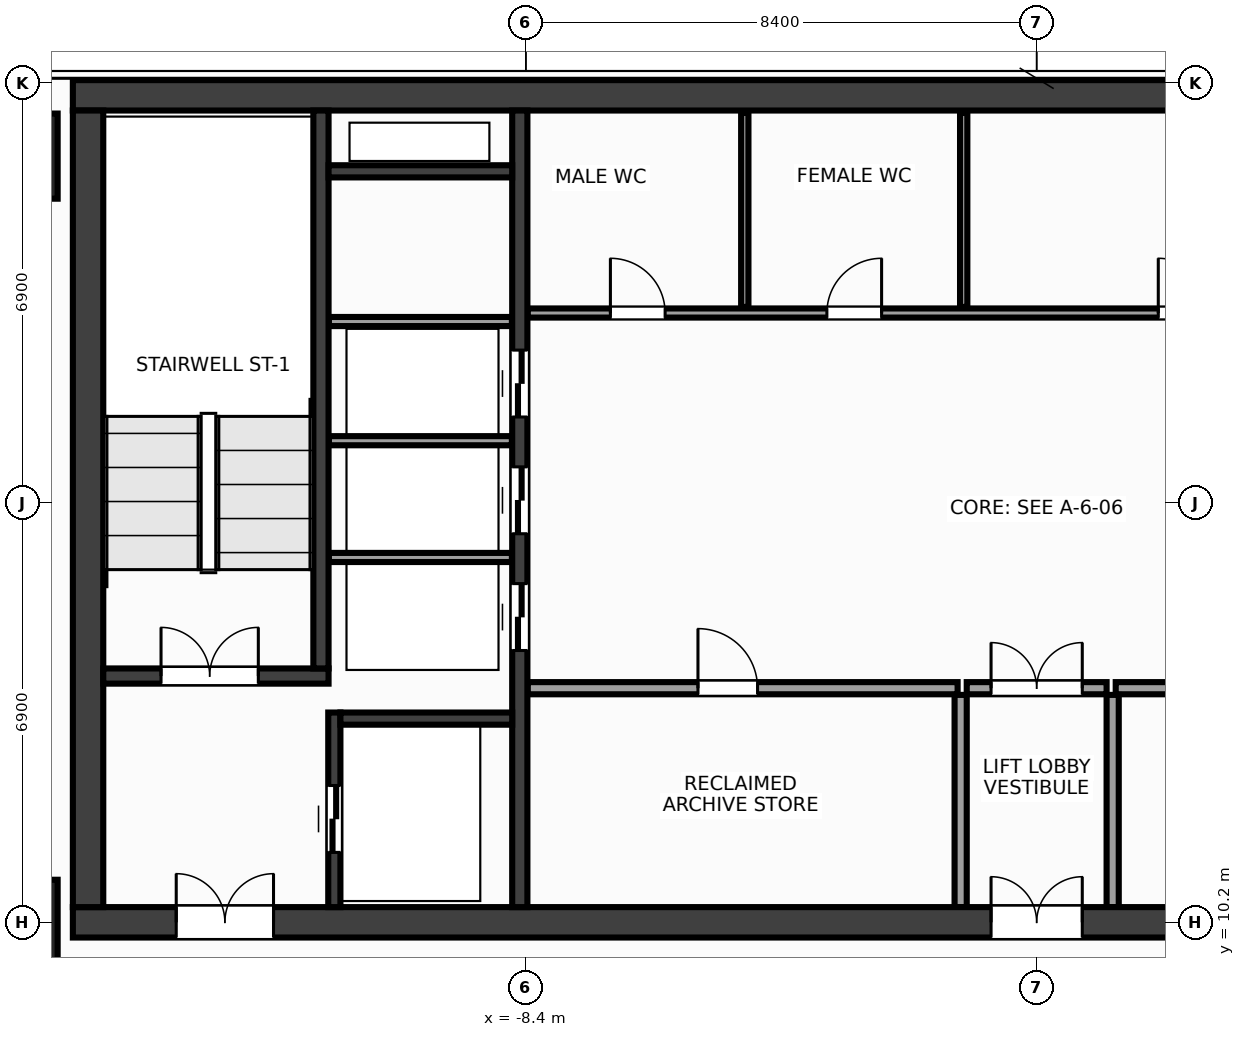
"""IFC4 building model, lengths in metres.
Left out: names, types, materials, properties, quantities, classifications, styles, units other than length and angle.
Written with IfcOpenShell. Run it as: python <this file> out.ifc"""

import sys

from ifc_helpers import new_model, si_unit, direction, frame, frame_2d, origin, origin_2d, place, context, subcontext, project, spatial, rectangle, extrude, source, transform, mapped, element, fill, save


model = new_model("IFC4")
c1 = context("Model", 3, precision=1e-05, world=origin(), true_north=direction((0.0, 1.0)))
c2 = subcontext(c1, "Body", "Model", "MODEL_VIEW")
j1 = project(units=[si_unit("LENGTHUNIT", "METRE"), si_unit("PLANEANGLEUNIT", "RADIAN")], contexts=[c1])
p1 = place(None, origin())
s1 = spatial("IfcSite", under=j1, at=p1, CompositionType="ELEMENT")
p2 = place(p1, origin())
s2 = spatial("IfcBuilding", under=s1, at=p2, CompositionType="ELEMENT")
p3 = place(p2, frame((0.0, 0.0, 268.4)))
s3 = spatial("IfcBuildingStorey", under=s2, at=p3, CompositionType="ELEMENT", Elevation=268.4)
m1 = source(origin(), c2, "Body", "SweptSolid", [
    extrude(rectangle(XDim=31.7, YDim=0.5, at=frame_2d((15.85, 0.0))), origin(), (0.0, 0.0, 1.0), 3.6),
])
p4 = place(p3, frame((-15.85, 23.8, 0.0), z_axis=(0.0, 0.0, 1.0), x_axis=(1.0, 0.0, 0.0)))
e1 = element("IfcWall", 1, at=p4, inside=s3, PredefinedType="SHEAR", context=c2, shape_type="MappedRepresentation", body=[
    mapped(m1, transform((0.0, 0.0, 0.0), x_axis=(1.0, 0.0, 0.0), y_axis=(0.0, 1.0, 0.0), z_axis=(0.0, 0.0, 1.0), scale=1.0)),
])
p5 = place(p3, frame((-15.85, 10.2, 0.0), z_axis=(0.0, 0.0, 1.0), x_axis=(1.0, 0.0, 0.0)))
e2 = element("IfcWall", 2, at=p5, inside=s3, PredefinedType="SHEAR", context=c2, shape_type="MappedRepresentation", body=[
    mapped(m1, transform((0.0, 0.0, 0.0), x_axis=(1.0, 0.0, 0.0), y_axis=(0.0, 1.0, 0.0), z_axis=(0.0, 0.0, 1.0), scale=1.0)),
])
p6 = place(p5, frame((1.7, 0.0, 0.0)))
e3 = element("IfcOpeningElement", 3, at=p6, cuts=e2, PredefinedType="OPENING", context=c2, shape_type="SweptSolid", body=[
    extrude(rectangle(XDim=1.6, YDim=2.15, at=frame_2d((0.8, 1.075))), frame((0.0, 0.262, 0.0), z_axis=(0.0, -1.0, 0.0), x_axis=(1.0, 0.0, 0.0)), (0.0, 0.0, 1.0), 0.524),
])
p7 = place(p5, frame((28.4, 0.0, 0.0)))
e4 = element("IfcOpeningElement", 4, at=p7, cuts=e2, PredefinedType="OPENING", context=c2, shape_type="SweptSolid", body=[
    extrude(rectangle(XDim=1.6, YDim=2.15, at=frame_2d((0.8, 1.075))), frame((0.0, 0.262, 0.0), z_axis=(0.0, -1.0, 0.0), x_axis=(1.0, 0.0, 0.0)), (0.0, 0.0, 1.0), 0.524),
])
p8 = place(p5, frame((15.1, 0.0, 0.0)))
e5 = element("IfcOpeningElement", 5, at=p8, cuts=e2, PredefinedType="OPENING", context=c2, shape_type="SweptSolid", body=[
    extrude(rectangle(XDim=1.5, YDim=2.2, at=frame_2d((0.75, 1.1))), frame((0.0, 0.262, 0.0), z_axis=(0.0, -1.0, 0.0), x_axis=(1.0, 0.0, 0.0)), (0.0, 0.0, 1.0), 0.524),
])
m2 = source(origin(), c2, "Body", "SweptSolid", [
    extrude(rectangle(XDim=13.1, YDim=0.5, at=frame_2d((6.55, 0.0))), origin(), (0.0, 0.0, 1.0), 3.6),
])
p9 = place(p3, frame((-15.6, 10.45, 0.0), z_axis=(0.0, 0.0, 1.0), x_axis=(0.0, 1.0, 0.0)))
e6 = element("IfcWall", 6, at=p9, inside=s3, PredefinedType="SHEAR", context=c2, shape_type="MappedRepresentation", body=[
    mapped(m2, transform((0.0, 0.0, 0.0), x_axis=(1.0, 0.0, 0.0), y_axis=(0.0, 1.0, 0.0), z_axis=(0.0, 0.0, 1.0), scale=1.0)),
])
m3 = source(origin(), c2, "Body", "SweptSolid", [
    extrude(rectangle(XDim=13.1, YDim=0.25, at=frame_2d((6.55, 0.0))), origin(), (0.0, 0.0, 1.0), 3.6),
])
p10 = place(p3, frame((-8.5, 10.45, 0.0), z_axis=(0.0, 0.0, 1.0), x_axis=(0.0, 1.0, 0.0)))
e7 = element("IfcWall", 7, at=p10, inside=s3, PredefinedType="SHEAR", context=c2, shape_type="MappedRepresentation", body=[
    mapped(m3, transform((0.0, 0.0, 0.0), x_axis=(1.0, 0.0, 0.0), y_axis=(0.0, 1.0, 0.0), z_axis=(0.0, 0.0, 1.0), scale=1.0)),
])
p11 = place(p10, frame((4.22, 0.0, 0.0)))
e8 = element("IfcOpeningElement", 8, at=p11, cuts=e7, PredefinedType="OPENING", context=c2, shape_type="SweptSolid", body=[
    extrude(rectangle(XDim=1.1, YDim=2.15, at=frame_2d((0.55, 1.075))), frame((0.0, 0.137, 0.0), z_axis=(0.0, -1.0, 0.0), x_axis=(1.0, 0.0, 0.0)), (0.0, 0.0, 1.0), 0.274),
])
p12 = place(p10, frame((6.14, 0.0, 0.0)))
e9 = element("IfcOpeningElement", 9, at=p12, cuts=e7, PredefinedType="OPENING", context=c2, shape_type="SweptSolid", body=[
    extrude(rectangle(XDim=1.1, YDim=2.15, at=frame_2d((0.55, 1.075))), frame((0.0, 0.137, 0.0), z_axis=(0.0, -1.0, 0.0), x_axis=(1.0, 0.0, 0.0)), (0.0, 0.0, 1.0), 0.274),
])
p13 = place(p10, frame((8.06, 0.0, 0.0)))
e10 = element("IfcOpeningElement", 10, at=p13, cuts=e7, PredefinedType="OPENING", context=c2, shape_type="SweptSolid", body=[
    extrude(rectangle(XDim=1.1, YDim=2.15, at=frame_2d((0.55, 1.075))), frame((0.0, 0.137, 0.0), z_axis=(0.0, -1.0, 0.0), x_axis=(1.0, 0.0, 0.0)), (0.0, 0.0, 1.0), 0.274),
])
m4 = source(origin(), c2, "Body", "SweptSolid", [
    extrude(rectangle(XDim=3.705, YDim=0.25, at=frame_2d((1.853, 0.0))), origin(), (0.0, 0.0, 1.0), 3.6),
])
p14 = place(p3, frame((-15.35, 14.25, 0.0), z_axis=(0.0, 0.0, 1.0), x_axis=(1.0, 0.0, 0.0)))
e11 = element("IfcWall", 11, at=p14, inside=s3, PredefinedType="SHEAR", context=c2, shape_type="MappedRepresentation", body=[
    mapped(m4, transform((0.0, 0.0, 0.0), x_axis=(1.0, 0.0, 0.0), y_axis=(0.0, 1.0, 0.0), z_axis=(0.0, 0.0, 1.0), scale=1.0)),
])
p15 = place(p14, frame((0.95, 0.0, 0.0)))
e12 = element("IfcOpeningElement", 12, at=p15, cuts=e11, PredefinedType="OPENING", context=c2, shape_type="SweptSolid", body=[
    extrude(rectangle(XDim=1.6, YDim=2.15, at=frame_2d((0.8, 1.075))), frame((0.0, 0.137, 0.0), z_axis=(0.0, -1.0, 0.0), x_axis=(1.0, 0.0, 0.0)), (0.0, 0.0, 1.0), 0.274),
])
m5 = source(origin(), c2, "Body", "SweptSolid", [
    extrude(rectangle(XDim=9.175, YDim=0.25, at=frame_2d((4.587, 0.0))), origin(), (0.0, 0.0, 1.0), 3.6),
])
p16 = place(p3, frame((-11.77, 14.375, 0.0), z_axis=(0.0, 0.0, 1.0), x_axis=(0.0, 1.0, 0.0)))
e13 = element("IfcWall", 13, at=p16, inside=s3, PredefinedType="SHEAR", context=c2, shape_type="MappedRepresentation", body=[
    mapped(m5, transform((0.0, 0.0, 0.0), x_axis=(1.0, 0.0, 0.0), y_axis=(0.0, 1.0, 0.0), z_axis=(0.0, 0.0, 1.0), scale=1.0)),
])
m6 = source(origin(), c2, "Body", "SweptSolid", [
    extrude(rectangle(XDim=3.2, YDim=0.2, at=frame_2d((1.6, 0.0))), origin(), (0.0, 0.0, 1.0), 3.6),
])
p17 = place(p3, frame((-11.55, 10.45, 0.0), z_axis=(0.0, 0.0, 1.0), x_axis=(0.0, 1.0, 0.0)))
e14 = element("IfcWall", 14, at=p17, inside=s3, PredefinedType="SHEAR", context=c2, shape_type="MappedRepresentation", body=[
    mapped(m6, transform((0.0, 0.0, 0.0), x_axis=(1.0, 0.0, 0.0), y_axis=(0.0, 1.0, 0.0), z_axis=(0.0, 0.0, 1.0), scale=1.0)),
])
p18 = place(p17, frame((0.9, 0.0, 0.0)))
e15 = element("IfcOpeningElement", 15, at=p18, cuts=e14, PredefinedType="OPENING", context=c2, shape_type="SweptSolid", body=[
    extrude(rectangle(XDim=1.1, YDim=2.15, at=frame_2d((0.55, 1.075))), frame((0.0, 0.112, 0.0), z_axis=(0.0, -1.0, 0.0), x_axis=(1.0, 0.0, 0.0)), (0.0, 0.0, 1.0), 0.224),
])
m7 = source(origin(), c2, "Body", "SweptSolid", [
    extrude(rectangle(XDim=2.825, YDim=0.2, at=frame_2d((1.413, 0.0))), origin(), (0.0, 0.0, 1.0), 3.6),
])
p19 = place(p3, frame((-11.45, 13.55, 0.0), z_axis=(0.0, 0.0, 1.0), x_axis=(1.0, 0.0, 0.0)))
e16 = element("IfcWall", 16, at=p19, inside=s3, PredefinedType="SHEAR", context=c2, shape_type="MappedRepresentation", body=[
    mapped(m7, transform((0.0, 0.0, 0.0), x_axis=(1.0, 0.0, 0.0), y_axis=(0.0, 1.0, 0.0), z_axis=(0.0, 0.0, 1.0), scale=1.0)),
])
m8 = source(origin(), c2, "Body", "SweptSolid", [
    extrude(rectangle(XDim=3.02, YDim=0.2, at=frame_2d((1.51, 0.0))), origin(), (0.0, 0.0, 1.0), 3.6),
])
p20 = place(p3, frame((-11.645, 22.55, 0.0), z_axis=(0.0, 0.0, 1.0), x_axis=(1.0, 0.0, 0.0)))
e17 = element("IfcWall", 17, at=p20, inside=s3, PredefinedType="SHEAR", context=c2, shape_type="MappedRepresentation", body=[
    mapped(m8, transform((0.0, 0.0, 0.0), x_axis=(1.0, 0.0, 0.0), y_axis=(0.0, 1.0, 0.0), z_axis=(0.0, 0.0, 1.0), scale=1.0)),
])
m9 = source(origin(), c2, "Body", "SweptSolid", [
    extrude(rectangle(XDim=1.4, YDim=1.4, at=origin_2d()), origin(), (0.0, 0.0, 1.0), 3.6),
])
for number, where, z_axis, x_axis in (
    (18, (-16.8, 10.2, 0.0), (0.0, 0.0, 1.0), (1.0, 0.0, 0.0)),
    (19, (-16.8, 22.8, 0.0), (0.0, 0.0, 1.0), (1.0, 0.0, 0.0)),
):
    element("IfcColumn", number, at=place(p3, frame(where, z_axis=z_axis, x_axis=x_axis)), inside=s3, PredefinedType="COLUMN", context=c2, shape_type="MappedRepresentation", body=[
        mapped(m9, transform((0.0, 0.0, 0.0), x_axis=(1.0, 0.0, 0.0), y_axis=(0.0, 1.0, 0.0), z_axis=(0.0, 0.0, 1.0), scale=1.0)),
    ])
m10 = source(origin(), c2, "Body", "SweptSolid", [
    extrude(rectangle(XDim=3.01, YDim=0.15, at=frame_2d((1.505, 0.0))), origin(), (0.0, 0.0, 1.0), 3.37),
])
for number, where, z_axis, x_axis in (
    (20, (-11.64, 16.2, 0.0), (0.0, 0.0, 1.0), (1.0, 0.0, 0.0)),
    (21, (-11.64, 18.12, 0.0), (0.0, 0.0, 1.0), (1.0, 0.0, 0.0)),
    (22, (-11.64, 20.08, 0.0), (0.0, 0.0, 1.0), (1.0, 0.0, 0.0)),
):
    element("IfcWall", number, at=place(p3, frame(where, z_axis=z_axis, x_axis=x_axis)), inside=s3, PredefinedType="PARTITIONING", context=c2, shape_type="MappedRepresentation", body=[
        mapped(m10, transform((0.0, 0.0, 0.0), x_axis=(1.0, 0.0, 0.0), y_axis=(0.0, 1.0, 0.0), z_axis=(0.0, 0.0, 1.0), scale=1.0)),
    ])
m11 = source(origin(), c2, "Body", "SweptSolid", [
    extrude(rectangle(XDim=7.07, YDim=0.2, at=frame_2d((3.535, 0.0))), origin(), (0.0, 0.0, 1.0), 3.37),
])
p21 = place(p3, frame((-8.37, 14.05, 0.0), z_axis=(0.0, 0.0, 1.0), x_axis=(1.0, 0.0, 0.0)))
e23 = element("IfcWall", 23, at=p21, inside=s3, PredefinedType="PARTITIONING", context=c2, shape_type="MappedRepresentation", body=[
    mapped(m11, transform((0.0, 0.0, 0.0), x_axis=(1.0, 0.0, 0.0), y_axis=(0.0, 1.0, 0.0), z_axis=(0.0, 0.0, 1.0), scale=1.0)),
])
p22 = place(p21, frame((2.8, 0.0, 0.0)))
e24 = element("IfcOpeningElement", 24, at=p22, cuts=e23, PredefinedType="OPENING", context=c2, shape_type="SweptSolid", body=[
    extrude(rectangle(XDim=0.98, YDim=2.15, at=frame_2d((0.49, 1.075))), frame((0.0, 0.112, 0.0), z_axis=(0.0, -1.0, 0.0), x_axis=(1.0, 0.0, 0.0)), (0.0, 0.0, 1.0), 0.224),
])
p23 = place(p3, frame((1.3, 14.05, 0.0), z_axis=(0.0, 0.0, 1.0), x_axis=(1.0, 0.0, 0.0)))
e25 = element("IfcWall", 25, at=p23, inside=s3, PredefinedType="PARTITIONING", context=c2, shape_type="MappedRepresentation", body=[
    mapped(m11, transform((0.0, 0.0, 0.0), x_axis=(1.0, 0.0, 0.0), y_axis=(0.0, 1.0, 0.0), z_axis=(0.0, 0.0, 1.0), scale=1.0)),
])
p24 = place(p23, frame((2.8, 0.0, 0.0)))
e26 = element("IfcOpeningElement", 26, at=p24, cuts=e25, PredefinedType="OPENING", context=c2, shape_type="SweptSolid", body=[
    extrude(rectangle(XDim=0.98, YDim=2.15, at=frame_2d((0.49, 1.075))), frame((0.0, 0.112, 0.0), z_axis=(0.0, -1.0, 0.0), x_axis=(1.0, 0.0, 0.0)), (0.0, 0.0, 1.0), 0.224),
])
m12 = source(origin(), c2, "Body", "SweptSolid", [
    extrude(rectangle(XDim=3.49, YDim=0.2, at=frame_2d((1.745, 0.0))), origin(), (0.0, 0.0, 1.0), 3.37),
])
for number, where, z_axis, x_axis in (
    (27, (-1.25, 10.45, 0.0), (0.0, 0.0, 1.0), (0.0, 1.0, 0.0)),
    (28, (1.25, 10.45, 0.0), (0.0, 0.0, 1.0), (0.0, 1.0, 0.0)),
):
    element("IfcWall", number, at=place(p3, frame(where, z_axis=z_axis, x_axis=x_axis)), inside=s3, PredefinedType="PARTITIONING", context=c2, shape_type="MappedRepresentation", body=[
        mapped(m12, transform((0.0, 0.0, 0.0), x_axis=(1.0, 0.0, 0.0), y_axis=(0.0, 1.0, 0.0), z_axis=(0.0, 0.0, 1.0), scale=1.0)),
    ])
m13 = source(origin(), c2, "Body", "SweptSolid", [
    extrude(rectangle(XDim=2.3, YDim=0.2, at=frame_2d((1.15, 0.0))), origin(), (0.0, 0.0, 1.0), 3.37),
])
p25 = place(p3, frame((-1.15, 14.05, 0.0), z_axis=(0.0, 0.0, 1.0), x_axis=(1.0, 0.0, 0.0)))
e29 = element("IfcWall", 29, at=p25, inside=s3, PredefinedType="PARTITIONING", context=c2, shape_type="MappedRepresentation", body=[
    mapped(m13, transform((0.0, 0.0, 0.0), x_axis=(1.0, 0.0, 0.0), y_axis=(0.0, 1.0, 0.0), z_axis=(0.0, 0.0, 1.0), scale=1.0)),
])
p26 = place(p25, frame((0.4, 0.0, 0.0)))
e30 = element("IfcOpeningElement", 30, at=p26, cuts=e29, PredefinedType="OPENING", context=c2, shape_type="SweptSolid", body=[
    extrude(rectangle(XDim=1.5, YDim=2.2, at=frame_2d((0.75, 1.1))), frame((0.0, 0.112, 0.0), z_axis=(0.0, -1.0, 0.0), x_axis=(1.0, 0.0, 0.0)), (0.0, 0.0, 1.0), 0.224),
])
m14 = source(origin(), c2, "Body", "SweptSolid", [
    extrude(rectangle(XDim=14.59, YDim=0.15, at=frame_2d((7.295, 0.0))), origin(), (0.0, 0.0, 1.0), 3.37),
])
p27 = place(p3, frame((-8.37, 20.22, 0.0), z_axis=(0.0, 0.0, 1.0), x_axis=(1.0, 0.0, 0.0)))
e31 = element("IfcWall", 31, at=p27, inside=s3, PredefinedType="PARTITIONING", context=c2, shape_type="MappedRepresentation", body=[
    mapped(m14, transform((0.0, 0.0, 0.0), x_axis=(1.0, 0.0, 0.0), y_axis=(0.0, 1.0, 0.0), z_axis=(0.0, 0.0, 1.0), scale=1.0)),
])
p28 = place(p27, frame((1.36, 0.0, 0.0)))
e32 = element("IfcOpeningElement", 32, at=p28, cuts=e31, PredefinedType="OPENING", context=c2, shape_type="SweptSolid", body=[
    extrude(rectangle(XDim=0.9, YDim=2.15, at=frame_2d((0.45, 1.075))), frame((0.0, 0.087, 0.0), z_axis=(0.0, -1.0, 0.0), x_axis=(1.0, 0.0, 0.0)), (0.0, 0.0, 1.0), 0.174),
])
p29 = place(p27, frame((4.92, 0.0, 0.0)))
e33 = element("IfcOpeningElement", 33, at=p29, cuts=e31, PredefinedType="OPENING", context=c2, shape_type="SweptSolid", body=[
    extrude(rectangle(XDim=0.9, YDim=2.15, at=frame_2d((0.45, 1.075))), frame((0.0, 0.087, 0.0), z_axis=(0.0, -1.0, 0.0), x_axis=(1.0, 0.0, 0.0)), (0.0, 0.0, 1.0), 0.174),
])
p30 = place(p27, frame((10.37, 0.0, 0.0)))
e34 = element("IfcOpeningElement", 34, at=p30, cuts=e31, PredefinedType="OPENING", context=c2, shape_type="SweptSolid", body=[
    extrude(rectangle(XDim=0.9, YDim=2.15, at=frame_2d((0.45, 1.075))), frame((0.0, 0.087, 0.0), z_axis=(0.0, -1.0, 0.0), x_axis=(1.0, 0.0, 0.0)), (0.0, 0.0, 1.0), 0.174),
])
m15 = source(origin(), c2, "Body", "SweptSolid", [
    extrude(rectangle(XDim=3.19, YDim=0.12, at=frame_2d((1.595, 0.0))), origin(), (0.0, 0.0, 1.0), 3.37),
])
for number, where, z_axis, x_axis in (
    (35, (-4.8, 20.32, 0.0), (0.0, 0.0, 1.0), (0.0, 1.0, 0.0)),
    (36, (-1.2, 20.32, 0.0), (0.0, 0.0, 1.0), (0.0, 1.0, 0.0)),
):
    element("IfcWall", number, at=place(p3, frame(where, z_axis=z_axis, x_axis=x_axis)), inside=s3, PredefinedType="PARTITIONING", context=c2, shape_type="MappedRepresentation", body=[
        mapped(m15, transform((0.0, 0.0, 0.0), x_axis=(1.0, 0.0, 0.0), y_axis=(0.0, 1.0, 0.0), z_axis=(0.0, 0.0, 1.0), scale=1.0)),
    ])
m16 = source(origin(), c2, "Body", "SweptSolid", [
    extrude(rectangle(XDim=1.6, YDim=2.15, at=frame_2d((0.8, 1.075))), frame((0.0, 0.025, 0.0), z_axis=(0.0, -1.0, 0.0), x_axis=(1.0, 0.0, 0.0)), (0.0, 0.0, 1.0), 0.05),
])
p31 = place(p15, origin())
e37 = element("IfcDoor", 37, at=p31, inside=s3, OperationType="DOUBLE_DOOR_SINGLE_SWING", PredefinedType="DOOR", context=c2, shape_type="MappedRepresentation", body=[
    mapped(m16, transform((0.0, 0.0, 0.0), x_axis=(1.0, 0.0, 0.0), y_axis=(0.0, 1.0, 0.0), z_axis=(0.0, 0.0, 1.0), scale=1.0)),
])
fill(e12, e37)
p32 = place(p6, origin())
e38 = element("IfcDoor", 38, at=p32, inside=s3, OperationType="DOUBLE_DOOR_SINGLE_SWING", PredefinedType="DOOR", context=c2, shape_type="MappedRepresentation", body=[
    mapped(m16, transform((0.0, 0.0, 0.0), x_axis=(1.0, 0.0, 0.0), y_axis=(0.0, 1.0, 0.0), z_axis=(0.0, 0.0, 1.0), scale=1.0)),
])
fill(e3, e38)
m17 = source(origin(), c2, "Body", "SweptSolid", [
    extrude(rectangle(XDim=1.1, YDim=2.15, at=frame_2d((0.55, 1.075))), frame((0.0, 0.025, 0.0), z_axis=(0.0, -1.0, 0.0), x_axis=(1.0, 0.0, 0.0)), (0.0, 0.0, 1.0), 0.05),
])
p33 = place(p18, origin())
e39 = element("IfcDoor", 39, at=p33, inside=s3, OperationType="DOUBLE_DOOR_SLIDING", PredefinedType="DOOR", context=c2, shape_type="MappedRepresentation", body=[
    mapped(m17, transform((0.0, 0.0, 0.0), x_axis=(1.0, 0.0, 0.0), y_axis=(0.0, 1.0, 0.0), z_axis=(0.0, 0.0, 1.0), scale=1.0)),
])
fill(e15, e39)
p34 = place(p11, origin())
e40 = element("IfcDoor", 40, at=p34, inside=s3, OperationType="DOUBLE_DOOR_SLIDING", PredefinedType="DOOR", context=c2, shape_type="MappedRepresentation", body=[
    mapped(m17, transform((0.0, 0.0, 0.0), x_axis=(1.0, 0.0, 0.0), y_axis=(0.0, 1.0, 0.0), z_axis=(0.0, 0.0, 1.0), scale=1.0)),
])
fill(e8, e40)
p35 = place(p12, origin())
e41 = element("IfcDoor", 41, at=p35, inside=s3, OperationType="DOUBLE_DOOR_SLIDING", PredefinedType="DOOR", context=c2, shape_type="MappedRepresentation", body=[
    mapped(m17, transform((0.0, 0.0, 0.0), x_axis=(1.0, 0.0, 0.0), y_axis=(0.0, 1.0, 0.0), z_axis=(0.0, 0.0, 1.0), scale=1.0)),
])
fill(e9, e41)
p36 = place(p13, origin())
e42 = element("IfcDoor", 42, at=p36, inside=s3, OperationType="DOUBLE_DOOR_SLIDING", PredefinedType="DOOR", context=c2, shape_type="MappedRepresentation", body=[
    mapped(m17, transform((0.0, 0.0, 0.0), x_axis=(1.0, 0.0, 0.0), y_axis=(0.0, 1.0, 0.0), z_axis=(0.0, 0.0, 1.0), scale=1.0)),
])
fill(e10, e42)
m18 = source(origin(), c2, "Body", "SweptSolid", [
    extrude(rectangle(XDim=0.98, YDim=2.15, at=frame_2d((0.49, 1.075))), frame((0.0, 0.025, 0.0), z_axis=(0.0, -1.0, 0.0), x_axis=(1.0, 0.0, 0.0)), (0.0, 0.0, 1.0), 0.05),
])
p37 = place(p22, origin())
e43 = element("IfcDoor", 43, at=p37, inside=s3, OperationType="SINGLE_SWING_LEFT", PredefinedType="DOOR", context=c2, shape_type="MappedRepresentation", body=[
    mapped(m18, transform((0.0, 0.0, 0.0), x_axis=(1.0, 0.0, 0.0), y_axis=(0.0, 1.0, 0.0), z_axis=(0.0, 0.0, 1.0), scale=1.0)),
])
fill(e24, e43)
m19 = source(origin(), c2, "Body", "SweptSolid", [
    extrude(rectangle(XDim=1.5, YDim=2.2, at=frame_2d((0.75, 1.1))), frame((0.0, 0.025, 0.0), z_axis=(0.0, -1.0, 0.0), x_axis=(1.0, 0.0, 0.0)), (0.0, 0.0, 1.0), 0.05),
])
p38 = place(p26, origin())
e44 = element("IfcDoor", 44, at=p38, inside=s3, OperationType="DOUBLE_DOOR_SINGLE_SWING", PredefinedType="DOOR", context=c2, shape_type="MappedRepresentation", body=[
    mapped(m19, transform((0.0, 0.0, 0.0), x_axis=(1.0, 0.0, 0.0), y_axis=(0.0, 1.0, 0.0), z_axis=(0.0, 0.0, 1.0), scale=1.0)),
])
fill(e30, e44)
p39 = place(p8, origin())
e45 = element("IfcDoor", 45, at=p39, inside=s3, OperationType="DOUBLE_DOOR_SINGLE_SWING", PredefinedType="DOOR", context=c2, shape_type="MappedRepresentation", body=[
    mapped(m19, transform((0.0, 0.0, 0.0), x_axis=(1.0, 0.0, 0.0), y_axis=(0.0, 1.0, 0.0), z_axis=(0.0, 0.0, 1.0), scale=1.0)),
])
fill(e5, e45)
m20 = source(origin(), c2, "Body", "SweptSolid", [
    extrude(rectangle(XDim=0.9, YDim=2.15, at=frame_2d((0.45, 1.075))), frame((0.0, 0.025, 0.0), z_axis=(0.0, -1.0, 0.0), x_axis=(1.0, 0.0, 0.0)), (0.0, 0.0, 1.0), 0.05),
])
p40 = place(p28, origin())
e46 = element("IfcDoor", 46, at=p40, inside=s3, OperationType="SINGLE_SWING_LEFT", PredefinedType="DOOR", context=c2, shape_type="MappedRepresentation", body=[
    mapped(m20, transform((0.0, 0.0, 0.0), x_axis=(1.0, 0.0, 0.0), y_axis=(0.0, 1.0, 0.0), z_axis=(0.0, 0.0, 1.0), scale=1.0)),
])
fill(e32, e46)
p41 = place(p29, origin())
e47 = element("IfcDoor", 47, at=p41, inside=s3, OperationType="SINGLE_SWING_RIGHT", PredefinedType="DOOR", context=c2, shape_type="MappedRepresentation", body=[
    mapped(m20, transform((0.0, 0.0, 0.0), x_axis=(1.0, 0.0, 0.0), y_axis=(0.0, 1.0, 0.0), z_axis=(0.0, 0.0, 1.0), scale=1.0)),
])
fill(e33, e47)
p42 = place(p30, origin())
e48 = element("IfcDoor", 48, at=p42, inside=s3, OperationType="SINGLE_SWING_LEFT", PredefinedType="DOOR", context=c2, shape_type="MappedRepresentation", body=[
    mapped(m20, transform((0.0, 0.0, 0.0), x_axis=(1.0, 0.0, 0.0), y_axis=(0.0, 1.0, 0.0), z_axis=(0.0, 0.0, 1.0), scale=1.0)),
])
fill(e34, e48)
save(model, sys.argv[1])
